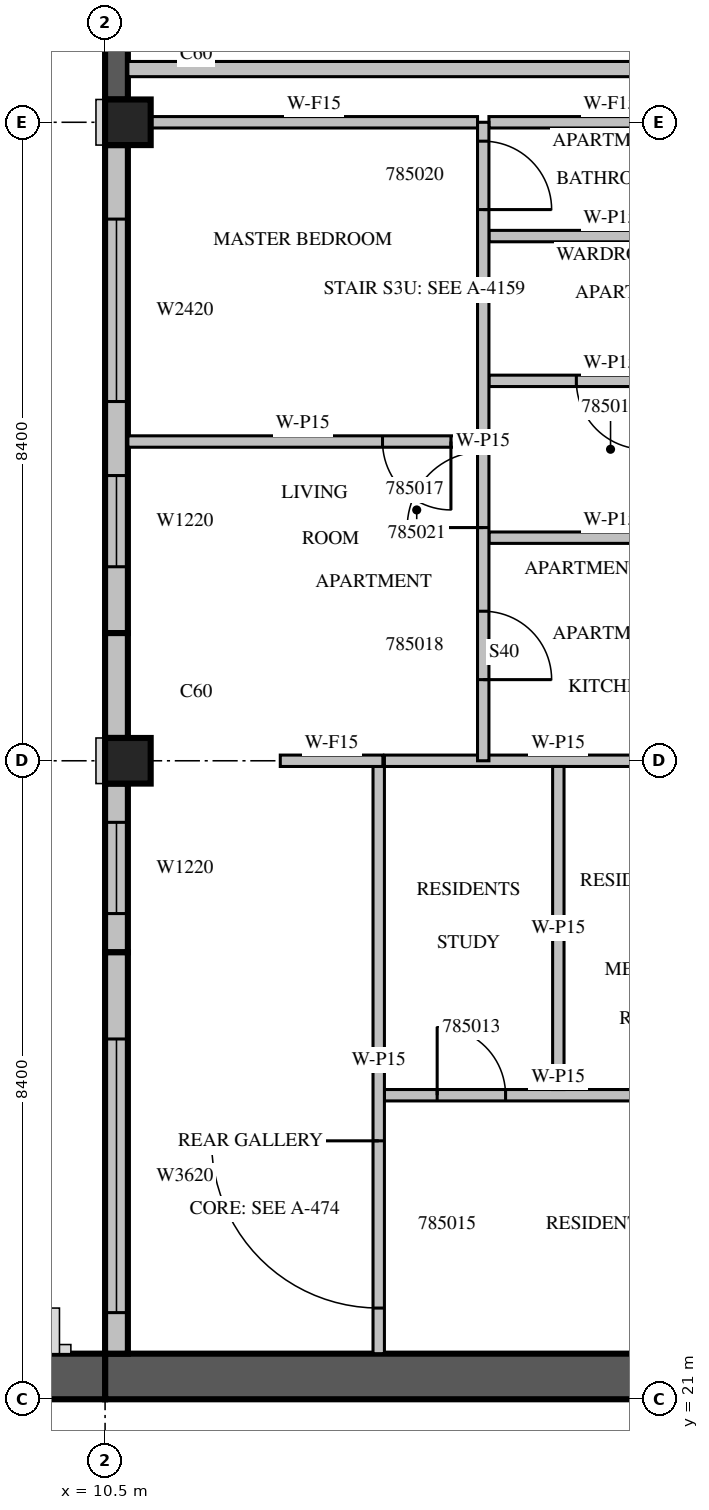
"""IFC4 building model, lengths in metres.
Left out: names, types, materials, properties, quantities, classifications, styles, units other than length and angle.
Written with IfcOpenShell. Run it as: python <this file> out.ifc"""

import sys

from ifc_helpers import new_model, si_unit, direction, frame, frame_2d, origin, origin_2d, place, context, subcontext, project, spatial, rectangle, extrude, source, transform, mapped, element, fill, save


model = new_model("IFC4")
c1 = context("Model", 3, precision=1e-05, world=origin(), true_north=direction((0.0, 1.0)))
c2 = subcontext(c1, "Body", "Model", "MODEL_VIEW")
j1 = project(units=[si_unit("LENGTHUNIT", "METRE"), si_unit("PLANEANGLEUNIT", "RADIAN")], contexts=[c1])
p1 = place(None, origin())
s1 = spatial("IfcSite", under=j1, at=p1, CompositionType="ELEMENT")
p2 = place(p1, origin())
s2 = spatial("IfcBuilding", under=s1, at=p2, CompositionType="ELEMENT")
p3 = place(p2, frame((0.0, 0.0, 358.0)))
s3 = spatial("IfcBuildingStorey", under=s2, at=p3, CompositionType="ELEMENT", Elevation=358.0)
m1 = source(origin(), c2, "Body", "SweptSolid", [
    extrude(rectangle(XDim=0.6, YDim=0.6, at=origin_2d()), origin(), (0.0, 0.0, 1.0), 3.5),
])
for number, where, z_axis, x_axis in (
    (1, (10.8, 29.4, 0.0), (0.0, 0.0, 1.0), (1.0, 0.0, 0.0)),
    (2, (10.8, 37.8, 0.0), (0.0, 0.0, 1.0), (1.0, 0.0, 0.0)),
):
    element("IfcColumn", number, at=place(p3, frame(where, z_axis=z_axis, x_axis=x_axis)), inside=s3, PredefinedType="COLUMN", context=c2, shape_type="MappedRepresentation", body=[
        mapped(m1, transform((0.0, 0.0, 0.0), scale=1.0)),
    ])
m2 = source(origin(), c2, "Body", "SweptSolid", [
    extrude(rectangle(XDim=11.1, YDim=0.6, at=frame_2d((5.55, 0.0))), origin(), (0.0, 0.0, 1.0), 3.5),
])
p4 = place(p3, frame((10.5, 21.3, 0.0), z_axis=(0.0, 0.0, 1.0), x_axis=(1.0, 0.0, 0.0)))
e3 = element("IfcWall", 3, at=p4, inside=s3, PredefinedType="SHEAR", context=c2, shape_type="MappedRepresentation", body=[
    mapped(m2, transform((0.0, 0.0, 0.0), scale=1.0)),
])
m3 = source(origin(), c2, "Body", "SweptSolid", [
    extrude(rectangle(XDim=1.2, YDim=2.1, at=frame_2d((0.6, 1.05))), frame((0.0, 0.31, 0.0), z_axis=(0.0, -1.0, 0.0), x_axis=(1.0, 0.0, 0.0)), (0.0, 0.0, 1.0), 0.62),
])
p5 = place(p4, frame((8.7, 0.0, 0.0)))
e4 = element("IfcOpeningElement", 4, at=p5, cuts=e3, PredefinedType="OPENING", context=c2, shape_type="MappedRepresentation", body=[
    mapped(m3, transform((0.0, 0.0, 0.0), scale=1.0)),
])
m4 = source(origin(), c2, "Body", "SweptSolid", [
    extrude(rectangle(XDim=6.6, YDim=0.6, at=frame_2d((3.3, 0.0))), origin(), (0.0, 0.0, 1.0), 3.5),
])
p6 = place(p3, frame((3.9, 21.3, 0.0), z_axis=(0.0, 0.0, 1.0), x_axis=(1.0, 0.0, 0.0)))
e5 = element("IfcWall", 5, at=p6, inside=s3, PredefinedType="SHEAR", context=c2, shape_type="MappedRepresentation", body=[
    mapped(m4, transform((0.0, 0.0, 0.0), scale=1.0)),
])
m5 = source(origin(), c2, "Body", "SweptSolid", [
    extrude(rectangle(XDim=1.2, YDim=2.4, at=frame_2d((0.6, 1.2))), frame((0.0, 0.31, 0.0), z_axis=(0.0, -1.0, 0.0), x_axis=(1.0, 0.0, 0.0)), (0.0, 0.0, 1.0), 0.62),
])
p7 = place(p6, frame((1.5, 0.0, 0.6)))
e6 = element("IfcOpeningElement", 6, at=p7, cuts=e5, PredefinedType="OPENING", context=c2, shape_type="MappedRepresentation", body=[
    mapped(m5, transform((0.0, 0.0, 0.0), scale=1.0)),
])
p8 = place(p6, frame((3.6, 0.0, 0.6)))
e7 = element("IfcOpeningElement", 7, at=p8, cuts=e5, PredefinedType="OPENING", context=c2, shape_type="MappedRepresentation", body=[
    mapped(m5, transform((0.0, 0.0, 0.0), scale=1.0)),
])
m6 = source(origin(), c2, "Body", "SweptSolid", [
    extrude(rectangle(XDim=5.58, YDim=0.3, at=frame_2d((2.79, 0.0))), origin(), (0.0, 0.0, 1.0), 3.1),
])
p9 = place(p3, frame((10.65, 43.68, 0.0), z_axis=(0.0, 0.0, 1.0), x_axis=(0.0, -1.0, 0.0)))
e8 = element("IfcWall", 8, at=p9, inside=s3, PredefinedType="SOLIDWALL", context=c2, shape_type="MappedRepresentation", body=[
    mapped(m6, transform((0.0, 0.0, 0.0), scale=1.0)),
])
m7 = source(origin(), c2, "Body", "SweptSolid", [
    extrude(rectangle(XDim=6.42, YDim=0.3, at=frame_2d((3.21, 0.0))), origin(), (0.0, 0.0, 1.0), 3.1),
])
p10 = place(p3, frame((10.65, 37.5, 0.0), z_axis=(0.0, 0.0, 1.0), x_axis=(0.0, -1.0, 0.0)))
e9 = element("IfcWall", 9, at=p10, inside=s3, PredefinedType="STANDARD", context=c2, shape_type="MappedRepresentation", body=[
    mapped(m7, transform((0.0, 0.0, 0.0), scale=1.0)),
])
m8 = source(origin(), c2, "Body", "SweptSolid", [
    extrude(rectangle(XDim=1.2, YDim=2.0, at=frame_2d((0.6, 1.0))), frame((0.0, 0.16, 0.0), z_axis=(0.0, -1.0, 0.0), x_axis=(1.0, 0.0, 0.0)), (0.0, 0.0, 1.0), 0.32),
])
p11 = place(p10, frame((4.348, 0.0, 0.6)))
e10 = element("IfcOpeningElement", 10, at=p11, cuts=e9, PredefinedType="OPENING", context=c2, shape_type="MappedRepresentation", body=[
    mapped(m8, transform((0.0, 0.0, 0.0), scale=1.0)),
])
m9 = source(origin(), c2, "Body", "SweptSolid", [
    extrude(rectangle(XDim=2.4, YDim=2.0, at=frame_2d((1.2, 1.0))), frame((0.0, 0.16, 0.0), z_axis=(0.0, -1.0, 0.0), x_axis=(1.0, 0.0, 0.0)), (0.0, 0.0, 1.0), 0.32),
])
p12 = place(p10, frame((0.974, 0.0, 0.6)))
e11 = element("IfcOpeningElement", 11, at=p12, cuts=e9, PredefinedType="OPENING", context=c2, shape_type="MappedRepresentation", body=[
    mapped(m9, transform((0.0, 0.0, 0.0), scale=1.0)),
])
m10 = source(origin(), c2, "Body", "SweptSolid", [
    extrude(rectangle(XDim=1.38, YDim=0.3, at=frame_2d((0.69, 0.0))), origin(), (0.0, 0.0, 1.0), 3.1),
])
p13 = place(p3, frame((10.65, 31.08, 0.0), z_axis=(0.0, 0.0, 1.0), x_axis=(0.0, -1.0, 0.0)))
e12 = element("IfcWall", 12, at=p13, inside=s3, PredefinedType="STANDARD", context=c2, shape_type="MappedRepresentation", body=[
    mapped(m10, transform((0.0, 0.0, 0.0), scale=1.0)),
])
m11 = source(origin(), c2, "Body", "SweptSolid", [
    extrude(rectangle(XDim=2.22, YDim=0.3, at=frame_2d((1.11, 0.0))), origin(), (0.0, 0.0, 1.0), 3.1),
])
p14 = place(p3, frame((10.65, 29.1, 0.0), z_axis=(0.0, 0.0, 1.0), x_axis=(0.0, -1.0, 0.0)))
e13 = element("IfcWall", 13, at=p14, inside=s3, PredefinedType="STANDARD", context=c2, shape_type="MappedRepresentation", body=[
    mapped(m11, transform((0.0, 0.0, 0.0), scale=1.0)),
])
p15 = place(p14, frame((0.51, 0.0, 0.6)))
e14 = element("IfcOpeningElement", 14, at=p15, cuts=e13, PredefinedType="OPENING", context=c2, shape_type="MappedRepresentation", body=[
    mapped(m8, transform((0.0, 0.0, 0.0), scale=1.0)),
])
m12 = source(origin(), c2, "Body", "SweptSolid", [
    extrude(rectangle(XDim=5.28, YDim=0.3, at=frame_2d((2.64, 0.0))), origin(), (0.0, 0.0, 1.0), 3.1),
])
p16 = place(p3, frame((10.65, 26.88, 0.0), z_axis=(0.0, 0.0, 1.0), x_axis=(0.0, -1.0, 0.0)))
e15 = element("IfcWall", 15, at=p16, inside=s3, PredefinedType="STANDARD", context=c2, shape_type="MappedRepresentation", body=[
    mapped(m12, transform((0.0, 0.0, 0.0), scale=1.0)),
])
m13 = source(origin(), c2, "Body", "SweptSolid", [
    extrude(rectangle(XDim=3.6, YDim=2.0, at=frame_2d((1.8, 1.0))), frame((0.0, 0.16, 0.0), z_axis=(0.0, -1.0, 0.0), x_axis=(1.0, 0.0, 0.0)), (0.0, 0.0, 1.0), 0.32),
])
p17 = place(p16, frame((1.14, 0.0, 0.6)))
e16 = element("IfcOpeningElement", 16, at=p17, cuts=e15, PredefinedType="OPENING", context=c2, shape_type="MappedRepresentation", body=[
    mapped(m13, transform((0.0, 0.0, 0.0), scale=1.0)),
])
m14 = source(origin(), c2, "Body", "SweptSolid", [
    extrude(rectangle(XDim=8.0, YDim=0.2, at=frame_2d((4.0, 0.0))), origin(), (0.0, 0.0, 1.0), 3.1),
])
p18 = place(p3, frame((10.8, 38.5, 0.0), z_axis=(0.0, 0.0, 1.0), x_axis=(1.0, 0.0, 0.0)))
e17 = element("IfcWall", 17, at=p18, inside=s3, PredefinedType="PARTITIONING", context=c2, shape_type="MappedRepresentation", body=[
    mapped(m14, transform((0.0, 0.0, 0.0), scale=1.0)),
])
m15 = source(origin(), c2, "Body", "SweptSolid", [
    extrude(rectangle(XDim=4.575, YDim=0.15, at=frame_2d((2.288, 0.0))), origin(), (0.0, 0.0, 1.0), 3.1),
])
p19 = place(p3, frame((14.175, 25.0, 0.0), z_axis=(0.0, 0.0, 1.0), x_axis=(1.0, 0.0, 0.0)))
e18 = element("IfcWall", 18, at=p19, inside=s3, PredefinedType="PARTITIONING", context=c2, shape_type="MappedRepresentation", body=[
    mapped(m15, transform((0.0, 0.0, 0.0), scale=1.0)),
])
m16 = source(origin(), c2, "Body", "SweptSolid", [
    extrude(rectangle(XDim=0.9, YDim=2.1, at=frame_2d((0.45, 1.05))), frame((0.0, 0.085, 0.0), z_axis=(0.0, -1.0, 0.0), x_axis=(1.0, 0.0, 0.0)), (0.0, 0.0, 1.0), 0.17),
])
p20 = place(p19, frame((0.694, 0.0, 0.0)))
e19 = element("IfcOpeningElement", 19, at=p20, cuts=e18, PredefinedType="OPENING", context=c2, shape_type="MappedRepresentation", body=[
    mapped(m16, transform((0.0, 0.0, 0.0), scale=1.0)),
])
p21 = place(p3, frame((18.75, 29.4, 0.0), z_axis=(0.0, 0.0, 1.0), x_axis=(-1.0, 0.0, 0.0)))
e20 = element("IfcWall", 20, at=p21, inside=s3, PredefinedType="PARTITIONING", context=c2, shape_type="MappedRepresentation", body=[
    mapped(m15, transform((0.0, 0.0, 0.0), scale=1.0)),
])
m17 = source(origin(), c2, "Body", "SweptSolid", [
    extrude(rectangle(XDim=4.25, YDim=0.15, at=frame_2d((2.125, 0.0))), origin(), (0.0, 0.0, 1.0), 3.1),
])
p22 = place(p3, frame((16.463, 25.075, 0.0), z_axis=(0.0, 0.0, 1.0), x_axis=(0.0, 1.0, 0.0)))
e21 = element("IfcWall", 21, at=p22, inside=s3, PredefinedType="PARTITIONING", context=c2, shape_type="MappedRepresentation", body=[
    mapped(m17, transform((0.0, 0.0, 0.0), scale=1.0)),
])
m18 = source(origin(), c2, "Body", "SweptSolid", [
    extrude(rectangle(XDim=7.725, YDim=0.15, at=frame_2d((3.862, 0.0))), origin(), (0.0, 0.0, 1.0), 3.1),
])
p23 = place(p3, frame((14.1, 29.325, 0.0), z_axis=(0.0, 0.0, 1.0), x_axis=(0.0, -1.0, 0.0)))
e22 = element("IfcWall", 22, at=p23, inside=s3, PredefinedType="PARTITIONING", context=c2, shape_type="MappedRepresentation", body=[
    mapped(m18, transform((0.0, 0.0, 0.0), scale=1.0)),
])
m19 = source(origin(), c2, "Body", "SweptSolid", [
    extrude(rectangle(XDim=2.2, YDim=2.1, at=frame_2d((1.1, 1.05))), frame((0.0, 0.085, 0.0), z_axis=(0.0, -1.0, 0.0), x_axis=(1.0, 0.0, 0.0)), (0.0, 0.0, 1.0), 0.17),
])
p24 = place(p23, frame((4.925, 0.0, 0.0)))
e23 = element("IfcOpeningElement", 23, at=p24, cuts=e22, PredefinedType="OPENING", context=c2, shape_type="MappedRepresentation", body=[
    mapped(m19, transform((0.0, 0.0, 0.0), scale=1.0)),
])
p25 = place(p3, frame((15.4, 33.6, 0.0), z_axis=(0.0, 0.0, 1.0), x_axis=(-1.0, 0.0, 0.0)))
e24 = element("IfcWall", 24, at=p25, inside=s3, PredefinedType="PARTITIONING", context=c2, shape_type="SweptSolid", body=[
    extrude(rectangle(XDim=4.6, YDim=0.15, at=frame_2d((2.3, 0.0))), origin(), (0.0, 0.0, 1.0), 3.1),
])
p26 = place(p25, frame((0.35, 0.0, 0.0)))
e25 = element("IfcOpeningElement", 25, at=p26, cuts=e24, PredefinedType="OPENING", context=c2, shape_type="MappedRepresentation", body=[
    mapped(m16, transform((0.0, 0.0, 0.0), scale=1.0)),
])
m20 = source(origin(), c2, "Body", "SweptSolid", [
    extrude(rectangle(XDim=3.2, YDim=0.15, at=frame_2d((1.6, 0.0))), origin(), (0.0, 0.0, 1.0), 3.1),
])
p27 = place(p3, frame((18.75, 32.335, 0.0), z_axis=(0.0, 0.0, 1.0), x_axis=(-1.0, 0.0, 0.0)))
e26 = element("IfcWall", 26, at=p27, inside=s3, PredefinedType="PARTITIONING", context=c2, shape_type="MappedRepresentation", body=[
    mapped(m20, transform((0.0, 0.0, 0.0), scale=1.0)),
])
p28 = place(p3, frame((18.75, 34.398, 0.0), z_axis=(0.0, 0.0, 1.0), x_axis=(-1.0, 0.0, 0.0)))
e27 = element("IfcWall", 27, at=p28, inside=s3, PredefinedType="PARTITIONING", context=c2, shape_type="MappedRepresentation", body=[
    mapped(m20, transform((0.0, 0.0, 0.0), scale=1.0)),
])
p29 = place(p28, frame((1.15, 0.0, 0.0)))
e28 = element("IfcOpeningElement", 28, at=p29, cuts=e27, PredefinedType="OPENING", context=c2, shape_type="MappedRepresentation", body=[
    mapped(m16, transform((0.0, 0.0, 0.0), scale=1.0)),
])
p30 = place(p3, frame((18.75, 36.303, 0.0), z_axis=(0.0, 0.0, 1.0), x_axis=(-1.0, 0.0, 0.0)))
e29 = element("IfcWall", 29, at=p30, inside=s3, PredefinedType="PARTITIONING", context=c2, shape_type="MappedRepresentation", body=[
    mapped(m20, transform((0.0, 0.0, 0.0), scale=1.0)),
])
m21 = source(origin(), c2, "Body", "SweptSolid", [
    extrude(rectangle(XDim=1.35, YDim=0.15, at=frame_2d((0.675, 0.0))), origin(), (0.0, 0.0, 1.0), 3.1),
])
p31 = place(p3, frame((14.155, 29.4, 0.0), z_axis=(0.0, 0.0, 1.0), x_axis=(-1.0, 0.0, 0.0)))
e30 = element("IfcWall", 30, at=p31, inside=s3, PredefinedType="PARTITIONING", context=c2, shape_type="MappedRepresentation", body=[
    mapped(m21, transform((0.0, 0.0, 0.0), scale=1.0)),
])
m22 = source(origin(), c2, "Body", "SweptSolid", [
    extrude(rectangle(XDim=4.301, YDim=0.15, at=frame_2d((2.151, 0.0))), origin(), (0.0, 0.0, 1.0), 3.1),
])
p32 = place(p3, frame((15.4, 37.8, 0.0), z_axis=(0.0, 0.0, 1.0), x_axis=(-1.0, 0.0, 0.0)))
e31 = element("IfcWall", 31, at=p32, inside=s3, PredefinedType="PARTITIONING", context=c2, shape_type="MappedRepresentation", body=[
    mapped(m22, transform((0.0, 0.0, 0.0), scale=1.0)),
])
p33 = place(p3, frame((18.75, 37.8, 0.0), z_axis=(0.0, 0.0, 1.0), x_axis=(-1.0, 0.0, 0.0)))
e32 = element("IfcWall", 32, at=p33, inside=s3, PredefinedType="PARTITIONING", context=c2, shape_type="MappedRepresentation", body=[
    mapped(m20, transform((0.0, 0.0, 0.0), scale=1.0)),
])
m23 = source(origin(), c2, "Body", "SweptSolid", [
    extrude(rectangle(XDim=8.4, YDim=0.15, at=frame_2d((4.2, 0.0))), origin(), (0.0, 0.0, 1.0), 3.1),
])
p34 = place(p3, frame((15.475, 29.4, 0.0), z_axis=(0.0, 0.0, 1.0), x_axis=(0.0, 1.0, 0.0)))
e33 = element("IfcWall", 33, at=p34, inside=s3, PredefinedType="PARTITIONING", context=c2, shape_type="MappedRepresentation", body=[
    mapped(m23, transform((0.0, 0.0, 0.0), scale=1.0)),
])
m24 = source(origin(), c2, "Body", "SweptSolid", [
    extrude(rectangle(XDim=1.0, YDim=2.1, at=frame_2d((0.5, 1.05))), frame((0.0, 0.085, 0.0), z_axis=(0.0, -1.0, 0.0), x_axis=(1.0, 0.0, 0.0)), (0.0, 0.0, 1.0), 0.17),
])
p35 = place(p34, frame((3.068, 0.0, 0.0)))
e34 = element("IfcOpeningElement", 34, at=p35, cuts=e33, PredefinedType="OPENING", context=c2, shape_type="MappedRepresentation", body=[
    mapped(m24, transform((0.0, 0.0, 0.0), scale=1.0)),
])
p36 = place(p34, frame((1.067, 0.0, 0.0)))
e35 = element("IfcOpeningElement", 35, at=p36, cuts=e33, PredefinedType="OPENING", context=c2, shape_type="MappedRepresentation", body=[
    mapped(m16, transform((0.0, 0.0, 0.0), scale=1.0)),
])
p37 = place(p34, frame((7.252, 0.0, 0.0)))
e36 = element("IfcOpeningElement", 36, at=p37, cuts=e33, PredefinedType="OPENING", context=c2, shape_type="MappedRepresentation", body=[
    mapped(m16, transform((0.0, 0.0, 0.0), scale=1.0)),
])
m25 = source(origin(), c2, "Body", "SweptSolid", [
    extrude(rectangle(XDim=1.2, YDim=2.0, at=frame_2d((0.6, 1.0))), frame((0.0, 0.03, 0.0), z_axis=(0.0, -1.0, 0.0), x_axis=(1.0, 0.0, 0.0)), (0.0, 0.0, 1.0), 0.06),
])
p38 = place(p11, origin())
e37 = element("IfcWindow", 37, at=p38, inside=s3, PartitioningType="SINGLE_PANEL", PredefinedType="WINDOW", context=c2, shape_type="MappedRepresentation", body=[
    mapped(m25, transform((0.0, 0.0, 0.0), scale=1.0)),
])
fill(e10, e37)
m26 = source(origin(), c2, "Body", "SweptSolid", [
    extrude(rectangle(XDim=2.4, YDim=2.0, at=frame_2d((1.2, 1.0))), frame((0.0, 0.03, 0.0), z_axis=(0.0, -1.0, 0.0), x_axis=(1.0, 0.0, 0.0)), (0.0, 0.0, 1.0), 0.06),
])
p39 = place(p12, origin())
e38 = element("IfcWindow", 38, at=p39, inside=s3, PartitioningType="SINGLE_PANEL", PredefinedType="WINDOW", context=c2, shape_type="MappedRepresentation", body=[
    mapped(m26, transform((0.0, 0.0, 0.0), scale=1.0)),
])
fill(e11, e38)
p40 = place(p15, origin())
e39 = element("IfcWindow", 39, at=p40, inside=s3, PartitioningType="SINGLE_PANEL", PredefinedType="WINDOW", context=c2, shape_type="MappedRepresentation", body=[
    mapped(m25, transform((0.0, 0.0, 0.0), scale=1.0)),
])
fill(e14, e39)
m27 = source(origin(), c2, "Body", "SweptSolid", [
    extrude(rectangle(XDim=3.6, YDim=2.0, at=frame_2d((1.8, 1.0))), frame((0.0, 0.03, 0.0), z_axis=(0.0, -1.0, 0.0), x_axis=(1.0, 0.0, 0.0)), (0.0, 0.0, 1.0), 0.06),
])
p41 = place(p17, origin())
e40 = element("IfcWindow", 40, at=p41, inside=s3, PartitioningType="SINGLE_PANEL", PredefinedType="WINDOW", context=c2, shape_type="MappedRepresentation", body=[
    mapped(m27, transform((0.0, 0.0, 0.0), scale=1.0)),
])
fill(e16, e40)
m28 = source(origin(), c2, "Body", "SweptSolid", [
    extrude(rectangle(XDim=0.9, YDim=2.1, at=frame_2d((0.45, 1.05))), frame((0.0, 0.025, 0.0), z_axis=(0.0, -1.0, 0.0), x_axis=(1.0, 0.0, 0.0)), (0.0, 0.0, 1.0), 0.05),
])
p42 = place(p20, origin())
e41 = element("IfcDoor", 41, at=p42, inside=s3, OperationType="SINGLE_SWING_LEFT", PredefinedType="DOOR", context=c2, shape_type="MappedRepresentation", body=[
    mapped(m28, transform((0.0, 0.0, 0.0), scale=1.0)),
])
fill(e19, e41)
m29 = source(origin(), c2, "Body", "SweptSolid", [
    extrude(rectangle(XDim=2.2, YDim=2.1, at=frame_2d((1.1, 1.05))), frame((0.0, 0.025, 0.0), z_axis=(0.0, -1.0, 0.0), x_axis=(1.0, 0.0, 0.0)), (0.0, 0.0, 1.0), 0.05),
])
p43 = place(p24, origin())
e42 = element("IfcDoor", 42, at=p43, inside=s3, OperationType="DOUBLE_DOOR_SINGLE_SWING", PredefinedType="DOOR", context=c2, shape_type="MappedRepresentation", body=[
    mapped(m29, transform((0.0, 0.0, 0.0), scale=1.0)),
])
fill(e23, e42)
m30 = source(origin(), c2, "Body", "SweptSolid", [
    extrude(rectangle(XDim=1.0, YDim=2.1, at=frame_2d((0.5, 1.05))), frame((0.0, 0.025, 0.0), z_axis=(0.0, -1.0, 0.0), x_axis=(1.0, 0.0, 0.0)), (0.0, 0.0, 1.0), 0.05),
])
p44 = place(p35, origin())
e43 = element("IfcDoor", 43, at=p44, inside=s3, OperationType="SINGLE_SWING_LEFT", PredefinedType="DOOR", context=c2, shape_type="MappedRepresentation", body=[
    mapped(m30, transform((0.0, 0.0, 0.0), scale=1.0)),
])
fill(e34, e43)
p45 = place(p36, origin())
e44 = element("IfcDoor", 44, at=p45, inside=s3, OperationType="SINGLE_SWING_RIGHT", PredefinedType="DOOR", context=c2, shape_type="MappedRepresentation", body=[
    mapped(m28, transform((0.0, 0.0, 0.0), scale=1.0)),
])
fill(e35, e44)
p46 = place(p29, origin())
e45 = element("IfcDoor", 45, at=p46, inside=s3, OperationType="SINGLE_SWING_LEFT", PredefinedType="DOOR", context=c2, shape_type="MappedRepresentation", body=[
    mapped(m28, transform((0.0, 0.0, 0.0), scale=1.0)),
])
fill(e28, e45)
p47 = place(p37, origin())
e46 = element("IfcDoor", 46, at=p47, inside=s3, OperationType="SINGLE_SWING_RIGHT", PredefinedType="DOOR", context=c2, shape_type="MappedRepresentation", body=[
    mapped(m28, transform((0.0, 0.0, 0.0), scale=1.0)),
])
fill(e36, e46)
p48 = place(p26, origin())
e47 = element("IfcDoor", 47, at=p48, inside=s3, OperationType="SINGLE_SWING_LEFT", PredefinedType="DOOR", context=c2, shape_type="MappedRepresentation", body=[
    mapped(m28, transform((0.0, 0.0, 0.0), scale=1.0)),
])
fill(e25, e47)
save(model, sys.argv[1])
